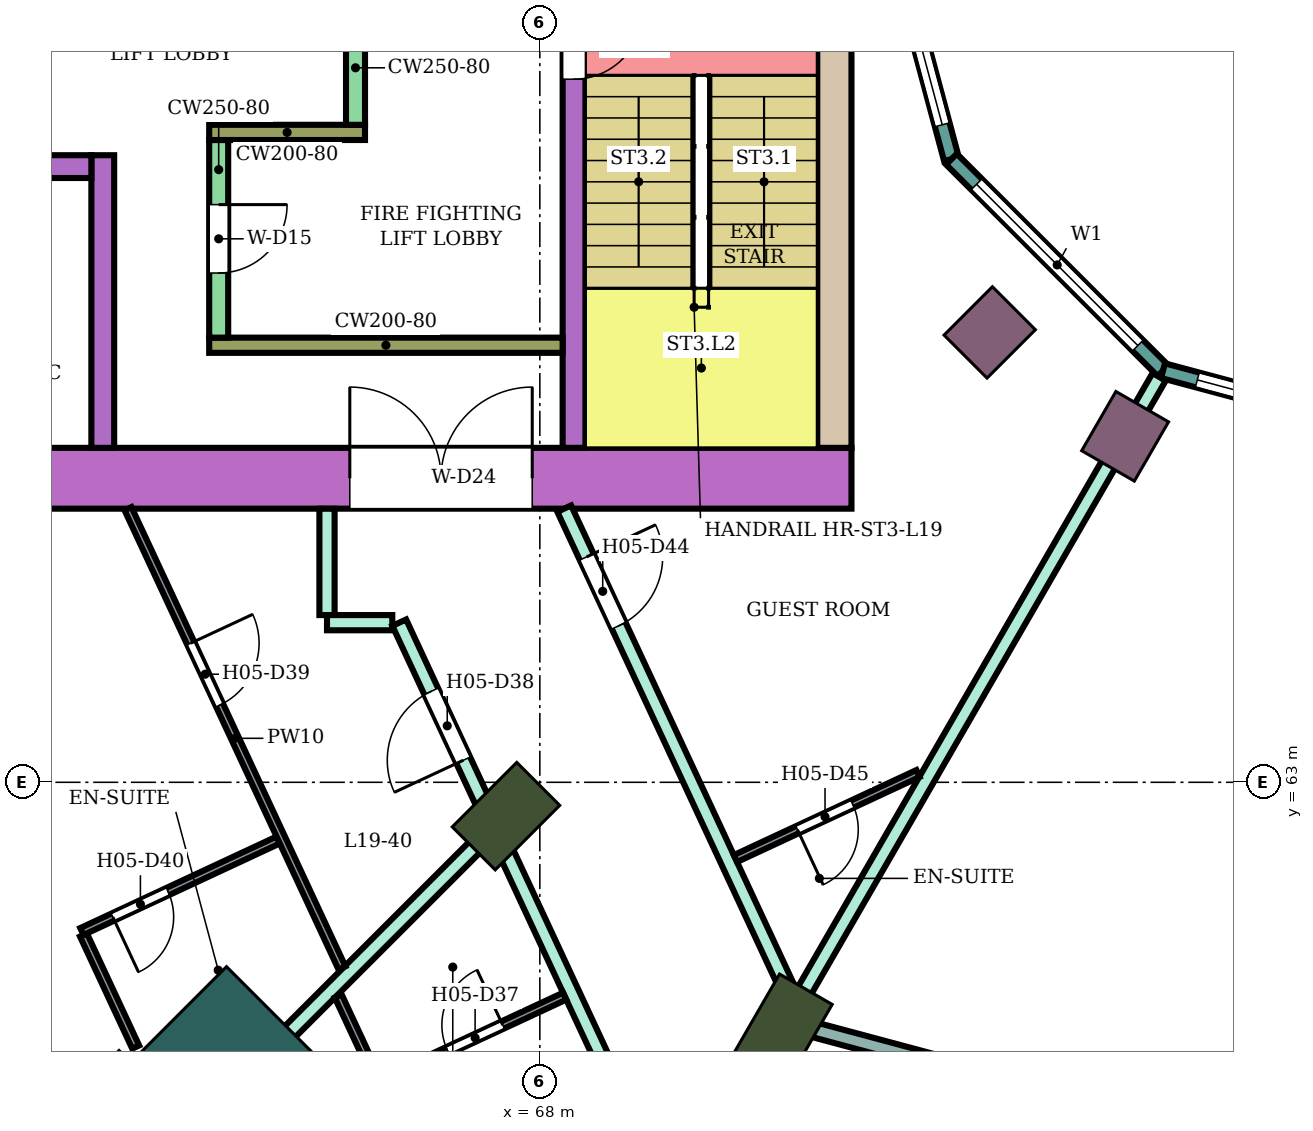
"""IFC4 building model, lengths in metres.
Left out: names, types, materials, properties, quantities, classifications, styles, units other than length and angle.
Written with IfcOpenShell. Run it as: python <this file> out.ifc"""

import sys

from ifc_helpers import new_model, si_unit, direction, frame, frame_2d, origin, origin_2d, place, context, subcontext, project, spatial, rectangle, extrude, element, fill, save


model = new_model("IFC4")
c1 = context("Model", 3, precision=1e-05, world=origin(), true_north=direction((0.0, 1.0)))
c2 = subcontext(c1, "Body", "Model", "MODEL_VIEW")
j1 = project(units=[si_unit("LENGTHUNIT", "METRE"), si_unit("PLANEANGLEUNIT", "RADIAN")], contexts=[c1])
p1 = place(None, origin())
s1 = spatial("IfcSite", under=j1, at=p1, CompositionType="ELEMENT")
p2 = place(p1, origin())
s2 = spatial("IfcBuilding", under=s1, at=p2, CompositionType="ELEMENT")
p3 = place(p2, frame((0.0, 0.0, 86.2)))
s3 = spatial("IfcBuildingStorey", under=s2, at=p3, CompositionType="ELEMENT", Elevation=86.2)
for number, where, z_axis, x_axis in (
    (1, (67.555, 62.555, 0.0), (0.0, 0.0, 1.0), (-0.707, -0.707, 0.0)),
    (2, (71.2, 59.758, 0.0), (0.0, 0.0, 1.0), (-0.5, -0.866, 0.0)),
):
    element("IfcColumn", number, at=place(p3, frame(where, z_axis=z_axis, x_axis=x_axis)), inside=s3, PredefinedType="COLUMN", context=c2, shape_type="SweptSolid", body=[
        extrude(rectangle(XDim=1.2, YDim=0.8, at=origin_2d()), origin(), (0.0, 0.0, 1.0), 3.8),
    ])
for number, where, z_axis, x_axis in (
    (3, (73.919, 68.919, 0.0), (0.0, 0.0, 1.0), (-0.707, -0.707, 0.0)),
    (4, (75.7, 67.552, 0.0), (0.0, 0.0, 1.0), (-0.5, -0.866, 0.0)),
):
    element("IfcColumn", number, at=place(p3, frame(where, z_axis=z_axis, x_axis=x_axis)), inside=s3, PredefinedType="COLUMN", context=c2, shape_type="SweptSolid", body=[
        extrude(rectangle(XDim=0.9, YDim=0.8, at=origin_2d()), origin(), (0.0, 0.0, 1.0), 3.8),
    ])
p4 = place(p3, frame((64.09, 59.09, 0.0), z_axis=(0.0, 0.0, 1.0), x_axis=(-0.707106781187, -0.707106781187, 0.0)))
e5 = element("IfcColumn", 5, at=p4, inside=s3, PredefinedType="COLUMN", context=c2, shape_type="SweptSolid", body=[
    extrude(rectangle(XDim=1.8, YDim=2.4, at=origin_2d()), origin(), (0.0, 0.0, 1.0), 3.8),
])
p5 = place(p3, frame((72.1, 67.0, 0.0), z_axis=(0.0, 0.0, 1.0), x_axis=(-1.0, 0.0, 0.0)))
e6 = element("IfcWall", 6, at=p5, inside=s3, PredefinedType="SHEAR", context=c2, shape_type="SweptSolid", body=[
    extrude(rectangle(XDim=14.7, YDim=0.8, at=frame_2d((7.35, 0.0))), origin(), (0.0, 0.0, 1.0), 3.48),
])
p6 = place(p5, frame((4.2, 0.0, 0.0)))
e7 = element("IfcOpeningElement", 7, at=p6, cuts=e6, PredefinedType="OPENING", context=c2, shape_type="SweptSolid", body=[
    extrude(rectangle(XDim=2.4, YDim=2.4, at=frame_2d((1.2, 1.2))), frame((0.0, 0.41, 0.0), z_axis=(0.0, -1.0, 0.0), x_axis=(1.0, 0.0, 0.0)), (0.0, 0.0, 1.0), 0.82),
])
p7 = place(p3, frame((71.875, 75.0, 0.0), z_axis=(0.0, 0.0, 1.0), x_axis=(0.0, -1.0, 0.0)))
e8 = element("IfcWall", 8, at=p7, inside=s3, PredefinedType="SHEAR", context=c2, shape_type="SweptSolid", body=[
    extrude(rectangle(XDim=7.6, YDim=0.45, at=frame_2d((3.8, 0.0))), origin(), (0.0, 0.0, 1.0), 3.48),
])
p8 = place(p3, frame((68.45, 75.0, 0.0), z_axis=(0.0, 0.0, 1.0), x_axis=(0.0, -1.0, 0.0)))
e9 = element("IfcWall", 9, at=p8, inside=s3, PredefinedType="SHEAR", context=c2, shape_type="SweptSolid", body=[
    extrude(rectangle(XDim=7.6, YDim=0.3, at=frame_2d((3.8, 0.0))), origin(), (0.0, 0.0, 1.0), 3.48),
])
p9 = place(p8, frame((1.85, 0.0, 0.0)))
e10 = element("IfcOpeningElement", 10, at=p9, cuts=e9, PredefinedType="OPENING", context=c2, shape_type="SweptSolid", body=[
    extrude(rectangle(XDim=0.9, YDim=2.1, at=frame_2d((0.45, 1.05))), frame((0.0, 0.16, 0.0), z_axis=(0.0, -1.0, 0.0), x_axis=(1.0, 0.0, 0.0)), (0.0, 0.0, 1.0), 0.32),
])
p10 = place(p3, frame((68.3, 68.75, 0.0), z_axis=(0.0, 0.0, 1.0), x_axis=(-1.0, 0.0, 0.0)))
e11 = element("IfcWall", 11, at=p10, inside=s3, PredefinedType="SHEAR", context=c2, shape_type="SweptSolid", body=[
    extrude(rectangle(XDim=4.65, YDim=0.2, at=frame_2d((2.325, 0.0))), origin(), (0.0, 0.0, 1.0), 3.48),
])
p11 = place(p3, frame((63.775, 71.45, 0.0), z_axis=(0.0, 0.0, 1.0), x_axis=(0.0, -1.0, 0.0)))
e12 = element("IfcWall", 12, at=p11, inside=s3, PredefinedType="SHEAR", context=c2, shape_type="SweptSolid", body=[
    extrude(rectangle(XDim=2.6, YDim=0.25, at=frame_2d((1.3, 0.0))), origin(), (0.0, 0.0, 1.0), 3.48),
])
p12 = place(p11, frame((0.85, 0.0, 0.0)))
e13 = element("IfcOpeningElement", 13, at=p12, cuts=e12, PredefinedType="OPENING", context=c2, shape_type="SweptSolid", body=[
    extrude(rectangle(XDim=0.9, YDim=2.1, at=frame_2d((0.45, 1.05))), frame((0.0, 0.135, 0.0), z_axis=(0.0, -1.0, 0.0), x_axis=(1.0, 0.0, 0.0)), (0.0, 0.0, 1.0), 0.27),
])
p13 = place(p3, frame((65.7, 71.55, 0.0), z_axis=(0.0, 0.0, 1.0), x_axis=(-1.0, 0.0, 0.0)))
e14 = element("IfcWall", 14, at=p13, inside=s3, PredefinedType="SHEAR", context=c2, shape_type="SweptSolid", body=[
    extrude(rectangle(XDim=2.05, YDim=0.2, at=frame_2d((1.025, 0.0))), origin(), (0.0, 0.0, 1.0), 3.48),
])
p14 = place(p3, frame((65.575, 73.15, 0.0), z_axis=(0.0, 0.0, 1.0), x_axis=(0.0, -1.0, 0.0)))
e15 = element("IfcWall", 15, at=p14, inside=s3, PredefinedType="SHEAR", context=c2, shape_type="SweptSolid", body=[
    extrude(rectangle(XDim=1.5, YDim=0.25, at=frame_2d((0.75, 0.0))), origin(), (0.0, 0.0, 1.0), 3.48),
])
p15 = place(p3, frame((62.25, 71.25, 0.0), z_axis=(0.0, 0.0, 1.0), x_axis=(0.0, -1.0, 0.0)))
e16 = element("IfcWall", 16, at=p15, inside=s3, PredefinedType="SHEAR", context=c2, shape_type="SweptSolid", body=[
    extrude(rectangle(XDim=3.85, YDim=0.3, at=frame_2d((1.925, 0.0))), origin(), (0.0, 0.0, 1.0), 3.48),
])
p16 = place(p3, frame((62.1, 71.1, 0.0), z_axis=(0.0, 0.0, 1.0), x_axis=(-1.0, 0.0, 0.0)))
e17 = element("IfcWall", 17, at=p16, inside=s3, PredefinedType="SHEAR", context=c2, shape_type="SweptSolid", body=[
    extrude(rectangle(XDim=4.7, YDim=0.3, at=frame_2d((2.35, 0.0))), origin(), (0.0, 0.0, 1.0), 3.48),
])
p17 = place(p16, frame((0.725, 0.0, 0.0)))
e18 = element("IfcOpeningElement", 18, at=p17, cuts=e17, PredefinedType="OPENING", context=c2, shape_type="SweptSolid", body=[
    extrude(rectangle(XDim=0.9, YDim=2.1, at=frame_2d((0.45, 1.05))), frame((0.0, 0.16, 0.0), z_axis=(0.0, -1.0, 0.0), x_axis=(1.0, 0.0, 0.0)), (0.0, 0.0, 1.0), 0.32),
])
p18 = place(p16, frame((3.075, 0.0, 0.0)))
e19 = element("IfcOpeningElement", 19, at=p18, cuts=e17, PredefinedType="OPENING", context=c2, shape_type="SweptSolid", body=[
    extrude(rectangle(XDim=0.9, YDim=2.1, at=frame_2d((0.45, 1.05))), frame((0.0, 0.16, 0.0), z_axis=(0.0, -1.0, 0.0), x_axis=(1.0, 0.0, 0.0)), (0.0, 0.0, 1.0), 0.32),
])
p19 = place(p3, frame((72.396, 75.0, 0.0), z_axis=(0.0, 0.0, 1.0), x_axis=(0.258789828301, -0.965933654434, 0.0)))
e20 = element("IfcWall", 20, at=p19, inside=s3, PredefinedType="NOTDEFINED", context=c2, shape_type="SweptSolid", body=[
    extrude(rectangle(XDim=3.936, YDim=0.2, at=frame_2d((1.968, 0.0))), origin(), (0.0, 0.0, 1.0), 3.8),
])
p20 = place(p19, frame((0.468, 0.0, 0.9)))
e21 = element("IfcOpeningElement", 21, at=p20, cuts=e20, PredefinedType="OPENING", context=c2, shape_type="SweptSolid", body=[
    extrude(rectangle(XDim=3.0, YDim=2.3, at=frame_2d((1.5, 1.15))), frame((0.0, 0.11, 0.0), z_axis=(0.0, -1.0, 0.0), x_axis=(1.0, 0.0, 0.0)), (0.0, 0.0, 1.0), 0.22),
])
p21 = place(p3, frame((73.415, 71.198, 0.0), z_axis=(0.0, 0.0, 1.0), x_axis=(0.707106781187, -0.707106781187, 0.0)))
e22 = element("IfcWall", 22, at=p21, inside=s3, PredefinedType="NOTDEFINED", context=c2, shape_type="SweptSolid", body=[
    extrude(rectangle(XDim=3.936, YDim=0.2, at=frame_2d((1.968, 0.0))), origin(), (0.0, 0.0, 1.0), 3.8),
])
p22 = place(p21, frame((0.468, 0.0, 0.9)))
e23 = element("IfcOpeningElement", 23, at=p22, cuts=e22, PredefinedType="OPENING", context=c2, shape_type="SweptSolid", body=[
    extrude(rectangle(XDim=3.0, YDim=2.3, at=frame_2d((1.5, 1.15))), frame((0.0, 0.11, 0.0), z_axis=(0.0, -1.0, 0.0), x_axis=(1.0, 0.0, 0.0)), (0.0, 0.0, 1.0), 0.22),
])
p23 = place(p3, frame((76.198, 68.415, 0.0), z_axis=(0.0, 0.0, 1.0), x_axis=(0.965933654434, -0.258789828301, 0.0)))
e24 = element("IfcWall", 24, at=p23, inside=s3, PredefinedType="NOTDEFINED", context=c2, shape_type="SweptSolid", body=[
    extrude(rectangle(XDim=3.936, YDim=0.2, at=frame_2d((1.968, 0.0))), origin(), (0.0, 0.0, 1.0), 3.8),
])
p24 = place(p23, frame((0.468, 0.0, 0.9)))
e25 = element("IfcOpeningElement", 25, at=p24, cuts=e24, PredefinedType="OPENING", context=c2, shape_type="SweptSolid", body=[
    extrude(rectangle(XDim=3.0, YDim=2.3, at=frame_2d((1.5, 1.15))), frame((0.0, 0.11, 0.0), z_axis=(0.0, -1.0, 0.0), x_axis=(1.0, 0.0, 0.0)), (0.0, 0.0, 1.0), 0.22),
])
p25 = place(p3, frame((63.593, 58.599, 0.0), z_axis=(0.0, 0.0, 1.0), x_axis=(0.707292874152, 0.706920639233, 0.0)))
e26 = element("IfcWall", 26, at=p25, inside=s3, PredefinedType="PARTITIONING", context=c2, shape_type="SweptSolid", body=[
    extrude(rectangle(XDim=5.247, YDim=0.2, at=frame_2d((2.624, 0.0))), origin(), (0.0, 0.0, 1.0), 3.35),
])
p26 = place(p3, frame((65.2, 65.2, 0.0), z_axis=(0.0, 0.0, 1.0), x_axis=(0.0, 1.0, 0.0)))
e27 = element("IfcWall", 27, at=p26, inside=s3, PredefinedType="PARTITIONING", context=c2, shape_type="SweptSolid", body=[
    extrude(rectangle(XDim=1.399, YDim=0.2, at=frame_2d((0.7, 0.0))), origin(), (0.0, 0.0, 1.0), 3.35),
])
p27 = place(p3, frame((65.2, 65.1, 0.0), z_axis=(0.0, 0.0, 1.0), x_axis=(1.0, 0.0, 0.0)))
e28 = element("IfcWall", 28, at=p27, inside=s3, PredefinedType="PARTITIONING", context=c2, shape_type="SweptSolid", body=[
    extrude(rectangle(XDim=0.859, YDim=0.2, at=frame_2d((0.43, 0.0))), origin(), (0.0, 0.0, 1.0), 3.35),
])
p28 = place(p3, frame((66.15, 65.1, 0.0), z_axis=(0.0, 0.0, 1.0), x_axis=(0.421874842351, -0.906654078131, 0.0)))
e29 = element("IfcWall", 29, at=p28, inside=s3, PredefinedType="PARTITIONING", context=c2, shape_type="SweptSolid", body=[
    extrude(rectangle(XDim=8.228, YDim=0.2, at=frame_2d((4.114, 0.0))), origin(), (0.0, 0.0, 1.0), 3.35),
])
p29 = place(p28, frame((6.748, 0.0, 0.0)))
e30 = element("IfcOpeningElement", 30, at=p29, cuts=e29, PredefinedType="OPENING", context=c2, shape_type="SweptSolid", body=[
    extrude(rectangle(XDim=1.0, YDim=2.1, at=frame_2d((0.5, 1.05))), frame((0.0, 0.11, 0.0), z_axis=(0.0, -1.0, 0.0), x_axis=(1.0, 0.0, 0.0)), (0.0, 0.0, 1.0), 0.22),
])
p30 = place(p28, frame((0.997, 0.0, 0.0)))
e31 = element("IfcOpeningElement", 31, at=p30, cuts=e29, PredefinedType="OPENING", context=c2, shape_type="SweptSolid", body=[
    extrude(rectangle(XDim=1.0, YDim=2.1, at=frame_2d((0.5, 1.05))), frame((0.0, 0.11, 0.0), z_axis=(0.0, -1.0, 0.0), x_axis=(1.0, 0.0, 0.0)), (0.0, 0.0, 1.0), 0.22),
])
p31 = place(p3, frame((68.321, 66.6, 0.0), z_axis=(0.0, 0.0, 1.0), x_axis=(0.421914092414, -0.906635813666, 0.0)))
e32 = element("IfcWall", 32, at=p31, inside=s3, PredefinedType="PARTITIONING", context=c2, shape_type="SweptSolid", body=[
    extrude(rectangle(XDim=7.459, YDim=0.2, at=frame_2d((3.73, 0.0))), origin(), (0.0, 0.0, 1.0), 3.35),
])
p32 = place(p31, frame((0.7, 0.0, 0.0)))
e33 = element("IfcOpeningElement", 33, at=p32, cuts=e32, PredefinedType="OPENING", context=c2, shape_type="SweptSolid", body=[
    extrude(rectangle(XDim=1.0, YDim=2.1, at=frame_2d((0.5, 1.05))), frame((0.0, 0.11, 0.0), z_axis=(0.0, -1.0, 0.0), x_axis=(1.0, 0.0, 0.0)), (0.0, 0.0, 1.0), 0.22),
])
p33 = place(p3, frame((71.459, 60.218, 0.0), z_axis=(0.0, 0.0, 1.0), x_axis=(0.500232027118, 0.865891401416, 0.0)))
e34 = element("IfcWall", 34, at=p33, inside=s3, PredefinedType="PARTITIONING", context=c2, shape_type="SweptSolid", body=[
    extrude(rectangle(XDim=9.372, YDim=0.2, at=frame_2d((4.686, 0.0))), origin(), (0.0, 0.0, 1.0), 3.35),
])
p34 = place(p3, frame((71.498, 59.774, 0.0), z_axis=(0.0, 0.0, 1.0), x_axis=(0.965911938046, -0.258870871168, 0.0)))
e35 = element("IfcWall", 35, at=p34, inside=s3, PredefinedType="PARTITIONING", context=c2, shape_type="SweptSolid", body=[
    extrude(rectangle(XDim=8.752, YDim=0.2, at=frame_2d((4.376, 0.0))), origin(), (0.0, 0.0, 1.0), 2.98),
])
p35 = place(p34, frame((4.701, 0.0, 0.0)))
e36 = element("IfcOpeningElement", 36, at=p35, cuts=e35, PredefinedType="OPENING", context=c2, shape_type="SweptSolid", body=[
    extrude(rectangle(XDim=1.8, YDim=2.1, at=frame_2d((0.9, 1.05))), frame((0.0, 0.11, 0.0), z_axis=(0.0, -1.0, 0.0), x_axis=(1.0, 0.0, 0.0)), (0.0, 0.0, 1.0), 0.22),
])
p36 = place(p3, frame((61.996, 60.992, 0.0), z_axis=(0.0, 0.0, 1.0), x_axis=(0.422318684634, -0.906447421867, 0.0)))
e37 = element("IfcWall", 37, at=p36, inside=s3, PredefinedType="PARTITIONING", context=c2, shape_type="SweptSolid", body=[
    extrude(rectangle(XDim=1.627, YDim=0.1, at=frame_2d((0.814, 0.0))), origin(), (0.0, 0.0, 1.0), 3.35),
])
p37 = place(p3, frame((61.975, 61.037, 0.0), z_axis=(0.0, 0.0, 1.0), x_axis=(0.906360368959, 0.422505481125, 0.0)))
e38 = element("IfcWall", 38, at=p37, inside=s3, PredefinedType="PARTITIONING", context=c2, shape_type="SweptSolid", body=[
    extrude(rectangle(XDim=2.849, YDim=0.1, at=frame_2d((1.425, 0.0))), origin(), (0.0, 0.0, 1.0), 3.35),
])
p38 = place(p37, frame((0.45, 0.0, 0.0)))
e39 = element("IfcOpeningElement", 39, at=p38, cuts=e38, PredefinedType="OPENING", context=c2, shape_type="SweptSolid", body=[
    extrude(rectangle(XDim=0.8, YDim=2.1, at=frame_2d((0.4, 1.05))), frame((0.0, 0.06, 0.0), z_axis=(0.0, -1.0, 0.0), x_axis=(1.0, 0.0, 0.0)), (0.0, 0.0, 1.0), 0.12),
])
p39 = place(p3, frame((62.582, 66.6, 0.0), z_axis=(0.0, 0.0, 1.0), x_axis=(0.422283870085, -0.906463641337, 0.0)))
e40 = element("IfcWall", 40, at=p39, inside=s3, PredefinedType="PARTITIONING", context=c2, shape_type="SweptSolid", body=[
    extrude(rectangle(XDim=6.666, YDim=0.1, at=frame_2d((3.333, 0.0))), origin(), (0.0, 0.0, 1.0), 3.35),
])
p40 = place(p39, frame((1.953, 0.0, 0.0)))
e41 = element("IfcOpeningElement", 41, at=p40, cuts=e40, PredefinedType="OPENING", context=c2, shape_type="SweptSolid", body=[
    extrude(rectangle(XDim=0.9, YDim=2.1, at=frame_2d((0.45, 1.05))), frame((0.0, 0.06, 0.0), z_axis=(0.0, -1.0, 0.0), x_axis=(1.0, 0.0, 0.0)), (0.0, 0.0, 1.0), 0.12),
])
p41 = place(p3, frame((65.348, 60.188, 0.0), z_axis=(0.0, 0.0, 1.0), x_axis=(0.422387529151, -0.906415343657, 0.0)))
e42 = element("IfcWall", 42, at=p41, inside=s3, PredefinedType="PARTITIONING", context=c2, shape_type="SweptSolid", body=[
    extrude(rectangle(XDim=1.208, YDim=0.1, at=frame_2d((0.604, 0.0))), origin(), (0.0, 0.0, 1.0), 3.35),
])
p42 = place(p3, frame((65.879, 59.048, 0.0), z_axis=(0.0, 0.0, 1.0), x_axis=(0.906746039995, 0.421677150144, 0.0)))
e43 = element("IfcWall", 43, at=p42, inside=s3, PredefinedType="PARTITIONING", context=c2, shape_type="SweptSolid", body=[
    extrude(rectangle(XDim=2.7, YDim=0.1, at=frame_2d((1.35, 0.0))), origin(), (0.0, 0.0, 1.0), 3.35),
])
p43 = place(p42, frame((1.0, 0.0, 0.0)))
e44 = element("IfcOpeningElement", 44, at=p43, cuts=e43, PredefinedType="OPENING", context=c2, shape_type="SweptSolid", body=[
    extrude(rectangle(XDim=0.8, YDim=2.1, at=frame_2d((0.4, 1.05))), frame((0.0, 0.06, 0.0), z_axis=(0.0, -1.0, 0.0), x_axis=(1.0, 0.0, 0.0)), (0.0, 0.0, 1.0), 0.12),
])
p44 = place(p3, frame((70.574, 61.997, 0.0), z_axis=(0.0, 0.0, 1.0), x_axis=(0.906503026865, 0.422199315826, 0.0)))
e45 = element("IfcWall", 45, at=p44, inside=s3, PredefinedType="PARTITIONING", context=c2, shape_type="SweptSolid", body=[
    extrude(rectangle(XDim=2.65, YDim=0.1, at=frame_2d((1.325, 0.0))), origin(), (0.0, 0.0, 1.0), 3.35),
])
p45 = place(p44, frame((0.9, 0.0, 0.0)))
e46 = element("IfcOpeningElement", 46, at=p45, cuts=e45, PredefinedType="OPENING", context=c2, shape_type="SweptSolid", body=[
    extrude(rectangle(XDim=0.8, YDim=2.1, at=frame_2d((0.4, 1.05))), frame((0.0, 0.06, 0.0), z_axis=(0.0, -1.0, 0.0), x_axis=(1.0, 0.0, 0.0)), (0.0, 0.0, 1.0), 0.12),
])
p46 = place(p20, origin())
e47 = element("IfcWindow", 47, at=p46, inside=s3, PartitioningType="SINGLE_PANEL", PredefinedType="WINDOW", context=c2, shape_type="SweptSolid", body=[
    extrude(rectangle(XDim=3.0, YDim=2.3, at=frame_2d((1.5, 1.15))), frame((0.0, 0.03, 0.0), z_axis=(0.0, -1.0, 0.0), x_axis=(1.0, 0.0, 0.0)), (0.0, 0.0, 1.0), 0.06),
])
fill(e21, e47)
p47 = place(p22, origin())
e48 = element("IfcWindow", 48, at=p47, inside=s3, PartitioningType="SINGLE_PANEL", PredefinedType="WINDOW", context=c2, shape_type="SweptSolid", body=[
    extrude(rectangle(XDim=3.0, YDim=2.3, at=frame_2d((1.5, 1.15))), frame((0.0, 0.03, 0.0), z_axis=(0.0, -1.0, 0.0), x_axis=(1.0, 0.0, 0.0)), (0.0, 0.0, 1.0), 0.06),
])
fill(e23, e48)
p48 = place(p24, origin())
e49 = element("IfcWindow", 49, at=p48, inside=s3, PartitioningType="SINGLE_PANEL", PredefinedType="WINDOW", context=c2, shape_type="SweptSolid", body=[
    extrude(rectangle(XDim=3.0, YDim=2.3, at=frame_2d((1.5, 1.15))), frame((0.0, 0.03, 0.0), z_axis=(0.0, -1.0, 0.0), x_axis=(1.0, 0.0, 0.0)), (0.0, 0.0, 1.0), 0.06),
])
fill(e25, e49)
p49 = place(p43, origin())
e50 = element("IfcDoor", 50, at=p49, inside=s3, OperationType="SINGLE_SWING_RIGHT", PredefinedType="DOOR", context=c2, shape_type="SweptSolid", body=[
    extrude(rectangle(XDim=0.8, YDim=2.1, at=frame_2d((0.4, 1.05))), frame((0.0, 0.025, 0.0), z_axis=(0.0, -1.0, 0.0), x_axis=(1.0, 0.0, 0.0)), (0.0, 0.0, 1.0), 0.05),
])
fill(e44, e50)
p50 = place(p30, frame((1.0, 0.0, 0.0), z_axis=(0.0, 0.0, 1.0), x_axis=(-1.0, 0.0, 0.0)))
e51 = element("IfcDoor", 51, at=p50, inside=s3, OperationType="SINGLE_SWING_LEFT", PredefinedType="DOOR", context=c2, shape_type="SweptSolid", body=[
    extrude(rectangle(XDim=1.0, YDim=2.1, at=frame_2d((0.5, 1.05))), frame((0.0, 0.025, 0.0), z_axis=(0.0, -1.0, 0.0), x_axis=(1.0, 0.0, 0.0)), (0.0, 0.0, 1.0), 0.05),
])
fill(e31, e51)
p51 = place(p40, origin())
e52 = element("IfcDoor", 52, at=p51, inside=s3, OperationType="SINGLE_SWING_LEFT", PredefinedType="DOOR", context=c2, shape_type="SweptSolid", body=[
    extrude(rectangle(XDim=0.9, YDim=2.1, at=frame_2d((0.45, 1.05))), frame((0.0, 0.025, 0.0), z_axis=(0.0, -1.0, 0.0), x_axis=(1.0, 0.0, 0.0)), (0.0, 0.0, 1.0), 0.05),
])
fill(e41, e52)
p52 = place(p38, frame((0.8, 0.0, 0.0), z_axis=(0.0, 0.0, 1.0), x_axis=(-1.0, 0.0, 0.0)))
e53 = element("IfcDoor", 53, at=p52, inside=s3, OperationType="SINGLE_SWING_RIGHT", PredefinedType="DOOR", context=c2, shape_type="SweptSolid", body=[
    extrude(rectangle(XDim=0.8, YDim=2.1, at=frame_2d((0.4, 1.05))), frame((0.0, 0.025, 0.0), z_axis=(0.0, -1.0, 0.0), x_axis=(1.0, 0.0, 0.0)), (0.0, 0.0, 1.0), 0.05),
])
fill(e39, e53)
p53 = place(p32, origin())
e54 = element("IfcDoor", 54, at=p53, inside=s3, OperationType="SINGLE_SWING_LEFT", PredefinedType="DOOR", context=c2, shape_type="SweptSolid", body=[
    extrude(rectangle(XDim=1.0, YDim=2.1, at=frame_2d((0.5, 1.05))), frame((0.0, 0.025, 0.0), z_axis=(0.0, -1.0, 0.0), x_axis=(1.0, 0.0, 0.0)), (0.0, 0.0, 1.0), 0.05),
])
fill(e33, e54)
p54 = place(p45, frame((0.8, 0.0, 0.0), z_axis=(0.0, 0.0, 1.0), x_axis=(-1.0, 0.0, 0.0)))
e55 = element("IfcDoor", 55, at=p54, inside=s3, OperationType="SINGLE_SWING_RIGHT", PredefinedType="DOOR", context=c2, shape_type="SweptSolid", body=[
    extrude(rectangle(XDim=0.8, YDim=2.1, at=frame_2d((0.4, 1.05))), frame((0.0, 0.025, 0.0), z_axis=(0.0, -1.0, 0.0), x_axis=(1.0, 0.0, 0.0)), (0.0, 0.0, 1.0), 0.05),
])
fill(e46, e55)
p55 = place(p9, origin())
e56 = element("IfcDoor", 56, at=p55, inside=s3, OperationType="SINGLE_SWING_LEFT", PredefinedType="DOOR", context=c2, shape_type="SweptSolid", body=[
    extrude(rectangle(XDim=0.9, YDim=2.1, at=frame_2d((0.45, 1.05))), frame((0.0, 0.025, 0.0), z_axis=(0.0, -1.0, 0.0), x_axis=(1.0, 0.0, 0.0)), (0.0, 0.0, 1.0), 0.05),
])
fill(e10, e56)
p56 = place(p12, origin())
e57 = element("IfcDoor", 57, at=p56, inside=s3, OperationType="SINGLE_SWING_LEFT", PredefinedType="DOOR", context=c2, shape_type="SweptSolid", body=[
    extrude(rectangle(XDim=0.9, YDim=2.1, at=frame_2d((0.45, 1.05))), frame((0.0, 0.025, 0.0), z_axis=(0.0, -1.0, 0.0), x_axis=(1.0, 0.0, 0.0)), (0.0, 0.0, 1.0), 0.05),
])
fill(e13, e57)
p57 = place(p6, frame((2.4, 0.0, 0.0), z_axis=(0.0, 0.0, 1.0), x_axis=(-1.0, 0.0, 0.0)))
e58 = element("IfcDoor", 58, at=p57, inside=s3, OperationType="DOUBLE_DOOR_SINGLE_SWING", PredefinedType="DOOR", context=c2, shape_type="SweptSolid", body=[
    extrude(rectangle(XDim=2.4, YDim=2.4, at=frame_2d((1.2, 1.2))), frame((0.0, 0.025, 0.0), z_axis=(0.0, -1.0, 0.0), x_axis=(1.0, 0.0, 0.0)), (0.0, 0.0, 1.0), 0.05),
])
fill(e7, e58)
save(model, sys.argv[1])
